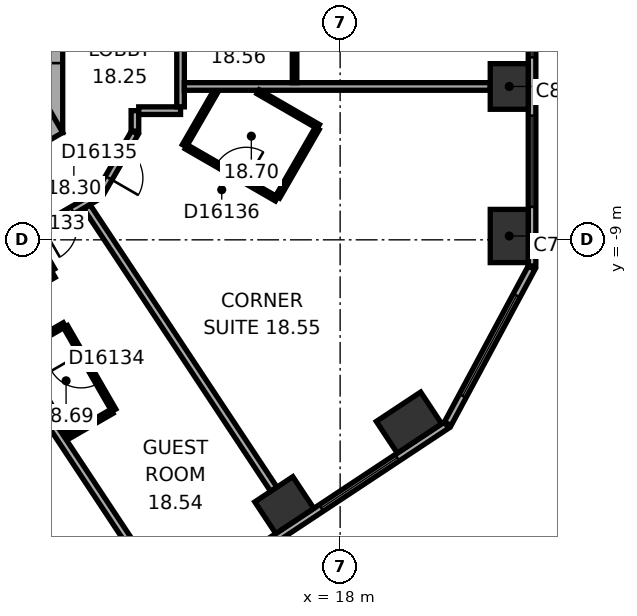
"""IFC4 building model, lengths in metres.
Left out: names, types, materials, properties, quantities, classifications, styles, units other than length and angle.
Written with IfcOpenShell. Run it as: python <this file> out.ifc"""

import sys

from ifc_helpers import new_model, si_unit, direction, frame, frame_2d, origin, origin_2d, place, context, subcontext, project, spatial, rectangle, extrude, element, fill, save


model = new_model("IFC4")
c1 = context("Model", 3, precision=1e-05, world=origin(), true_north=direction((0.0, 1.0)))
c2 = subcontext(c1, "Body", "Model", "MODEL_VIEW")
j1 = project(units=[si_unit("LENGTHUNIT", "METRE"), si_unit("PLANEANGLEUNIT", "RADIAN")], contexts=[c1])
p1 = place(None, origin())
s1 = spatial("IfcSite", under=j1, at=p1, CompositionType="ELEMENT")
p2 = place(p1, origin())
s2 = spatial("IfcBuilding", under=s1, at=p2, CompositionType="ELEMENT")
p3 = place(p2, frame((0.0, 0.0, 83.6)))
s3 = spatial("IfcBuildingStorey", under=s2, at=p3, CompositionType="ELEMENT", Elevation=83.6)
p4 = place(p3, frame((22.45, -8.899, 0.0), z_axis=(0.0, 0.0, 1.0), x_axis=(0.0, 1.0, 0.0)))
e1 = element("IfcColumn", 1, at=p4, inside=s3, PredefinedType="COLUMN", context=c2, shape_type="SweptSolid", body=[
    extrude(rectangle(XDim=1.4, YDim=1.0, at=origin_2d()), origin(), (0.0, 0.0, 1.0), 3.3),
])
for number, where, z_axis, x_axis in (
    (2, (22.45, -4.965, 0.0), (0.0, 0.0, 1.0), (0.0, 1.0, 0.0)),
    (3, (16.531, -15.981, 0.0), (0.0, 0.0, 1.0), (0.834, 0.552, 0.0)),
):
    element("IfcColumn", number, at=place(p3, frame(where, z_axis=z_axis, x_axis=x_axis)), inside=s3, PredefinedType="COLUMN", context=c2, shape_type="SweptSolid", body=[
        extrude(rectangle(XDim=1.2, YDim=1.0, at=origin_2d()), origin(), (0.0, 0.0, 1.0), 3.3),
    ])
p5 = place(p3, frame((19.812, -13.809, 0.0), z_axis=(0.0, 0.0, 1.0), x_axis=(0.833885822067, 0.551936985312, 0.0)))
e4 = element("IfcColumn", 4, at=p5, inside=s3, PredefinedType="COLUMN", context=c2, shape_type="SweptSolid", body=[
    extrude(rectangle(XDim=1.4, YDim=1.0, at=origin_2d()), origin(), (0.0, 0.0, 1.0), 3.3),
])
p6 = place(p3, frame((10.1, -6.177, 0.0), z_axis=(0.0, 0.0, 1.0), x_axis=(0.0, 1.0, 0.0)))
e5 = element("IfcWall", 5, at=p6, inside=s3, PredefinedType="SHEAR", context=c2, shape_type="SweptSolid", body=[
    extrude(rectangle(XDim=12.355, YDim=1.2, at=frame_2d((6.177, 0.0))), origin(), (0.0, 0.0, 1.0), 3.3),
])
p7 = place(p6, frame((6.378, 0.0, 0.0)))
e6 = element("IfcOpeningElement", 6, at=p7, cuts=e5, PredefinedType="OPENING", context=c2, shape_type="SweptSolid", body=[
    extrude(rectangle(XDim=1.5, YDim=2.1, at=frame_2d((0.75, 1.05))), frame((0.0, 0.61, 0.0), z_axis=(0.0, -1.0, 0.0), x_axis=(1.0, 0.0, 0.0)), (0.0, 0.0, 1.0), 1.22),
])
p8 = place(p6, frame((1.828, 0.0, 0.0)))
e7 = element("IfcOpeningElement", 7, at=p8, cuts=e5, PredefinedType="OPENING", context=c2, shape_type="SweptSolid", body=[
    extrude(rectangle(XDim=1.1, YDim=2.1, at=frame_2d((0.55, 1.05))), frame((0.0, 0.61, 0.0), z_axis=(0.0, -1.0, 0.0), x_axis=(1.0, 0.0, 0.0)), (0.0, 0.0, 1.0), 1.22),
])
p9 = place(p6, frame((4.427, 0.0, 0.0)))
e8 = element("IfcOpeningElement", 8, at=p9, cuts=e5, PredefinedType="OPENING", context=c2, shape_type="SweptSolid", body=[
    extrude(rectangle(XDim=1.1, YDim=2.1, at=frame_2d((0.55, 1.05))), frame((0.0, 0.61, 0.0), z_axis=(0.0, -1.0, 0.0), x_axis=(1.0, 0.0, 0.0)), (0.0, 0.0, 1.0), 1.22),
])
p10 = place(p3, frame((-0.3, -11.836, 0.0), z_axis=(0.0, 0.0, 1.0), x_axis=(0.866021384402, 0.500006961711, 0.0)))
e9 = element("IfcWall", 9, at=p10, inside=s3, PredefinedType="SHEAR", context=c2, shape_type="SweptSolid", body=[
    extrude(rectangle(XDim=12.355, YDim=1.2, at=frame_2d((6.178, 0.0))), origin(), (0.0, 0.0, 1.0), 3.3),
])
p11 = place(p10, frame((4.128, 0.0, 0.0)))
e10 = element("IfcOpeningElement", 10, at=p11, cuts=e9, PredefinedType="OPENING", context=c2, shape_type="SweptSolid", body=[
    extrude(rectangle(XDim=0.9, YDim=2.1, at=frame_2d((0.45, 1.05))), frame((0.0, 0.61, 0.0), z_axis=(0.0, -1.0, 0.0), x_axis=(1.0, 0.0, 0.0)), (0.0, 0.0, 1.0), 1.22),
])
p12 = place(p10, frame((7.928, 0.0, 0.0)))
e11 = element("IfcOpeningElement", 11, at=p12, cuts=e9, PredefinedType="OPENING", context=c2, shape_type="SweptSolid", body=[
    extrude(rectangle(XDim=1.1, YDim=2.1, at=frame_2d((0.55, 1.05))), frame((0.0, 0.61, 0.0), z_axis=(0.0, -1.0, 0.0), x_axis=(1.0, 0.0, 0.0)), (0.0, 0.0, 1.0), 1.22),
])
p13 = place(p3, frame((23.05, -9.687, 0.0), z_axis=(0.0, 0.0, 1.0), x_axis=(0.0, 1.0, 0.0)))
e12 = element("IfcWall", 12, at=p13, inside=s3, PredefinedType="STANDARD", context=c2, shape_type="SweptSolid", body=[
    extrude(rectangle(XDim=21.246, YDim=0.2, at=frame_2d((10.623, 0.0))), origin(), (0.0, 0.0, 1.0), 3.3),
])
p14 = place(p13, frame((1.555, 0.0, 0.8)))
e13 = element("IfcOpeningElement", 13, at=p14, cuts=e12, PredefinedType="OPENING", context=c2, shape_type="SweptSolid", body=[
    extrude(rectangle(XDim=2.4, YDim=1.7, at=frame_2d((1.2, 0.85))), frame((0.0, 0.11, 0.0), z_axis=(0.0, -1.0, 0.0), x_axis=(1.0, 0.0, 0.0)), (0.0, 0.0, 1.0), 0.22),
])
p15 = place(p13, frame((5.489, 0.0, 0.8)))
e14 = element("IfcOpeningElement", 14, at=p15, cuts=e12, PredefinedType="OPENING", context=c2, shape_type="SweptSolid", body=[
    extrude(rectangle(XDim=2.4, YDim=1.7, at=frame_2d((1.2, 0.85))), frame((0.0, 0.11, 0.0), z_axis=(0.0, -1.0, 0.0), x_axis=(1.0, 0.0, 0.0)), (0.0, 0.0, 1.0), 0.22),
])
p16 = place(p13, frame((9.424, 0.0, 0.8)))
e15 = element("IfcOpeningElement", 15, at=p16, cuts=e12, PredefinedType="OPENING", context=c2, shape_type="SweptSolid", body=[
    extrude(rectangle(XDim=2.4, YDim=1.7, at=frame_2d((1.2, 0.85))), frame((0.0, 0.11, 0.0), z_axis=(0.0, -1.0, 0.0), x_axis=(1.0, 0.0, 0.0)), (0.0, 0.0, 1.0), 0.22),
])
p17 = place(p13, frame((13.358, 0.0, 0.8)))
e16 = element("IfcOpeningElement", 16, at=p17, cuts=e12, PredefinedType="OPENING", context=c2, shape_type="SweptSolid", body=[
    extrude(rectangle(XDim=2.4, YDim=1.7, at=frame_2d((1.2, 0.85))), frame((0.0, 0.11, 0.0), z_axis=(0.0, -1.0, 0.0), x_axis=(1.0, 0.0, 0.0)), (0.0, 0.0, 1.0), 0.22),
])
p18 = place(p13, frame((17.293, 0.0, 0.8)))
e17 = element("IfcOpeningElement", 17, at=p18, cuts=e12, PredefinedType="OPENING", context=c2, shape_type="SweptSolid", body=[
    extrude(rectangle(XDim=2.4, YDim=1.7, at=frame_2d((1.2, 0.85))), frame((0.0, 0.11, 0.0), z_axis=(0.0, -1.0, 0.0), x_axis=(1.0, 0.0, 0.0)), (0.0, 0.0, 1.0), 0.22),
])
p19 = place(p3, frame((3.083, -25.601, 0.0), z_axis=(0.0, 0.0, 1.0), x_axis=(0.833884295743, 0.551939291329, 0.0)))
e18 = element("IfcWall", 18, at=p19, inside=s3, PredefinedType="STANDARD", context=c2, shape_type="SweptSolid", body=[
    extrude(rectangle(XDim=21.246, YDim=0.2, at=frame_2d((10.623, 0.0))), origin(), (0.0, 0.0, 1.0), 3.3),
])
p20 = place(p19, frame((1.553, 0.0, 0.8)))
e19 = element("IfcOpeningElement", 19, at=p20, cuts=e18, PredefinedType="OPENING", context=c2, shape_type="SweptSolid", body=[
    extrude(rectangle(XDim=2.4, YDim=1.7, at=frame_2d((1.2, 0.85))), frame((0.0, 0.11, 0.0), z_axis=(0.0, -1.0, 0.0), x_axis=(1.0, 0.0, 0.0)), (0.0, 0.0, 1.0), 0.22),
])
p21 = place(p19, frame((5.488, 0.0, 0.8)))
e20 = element("IfcOpeningElement", 20, at=p21, cuts=e18, PredefinedType="OPENING", context=c2, shape_type="SweptSolid", body=[
    extrude(rectangle(XDim=2.4, YDim=1.7, at=frame_2d((1.2, 0.85))), frame((0.0, 0.11, 0.0), z_axis=(0.0, -1.0, 0.0), x_axis=(1.0, 0.0, 0.0)), (0.0, 0.0, 1.0), 0.22),
])
p22 = place(p19, frame((9.422, 0.0, 0.8)))
e21 = element("IfcOpeningElement", 21, at=p22, cuts=e18, PredefinedType="OPENING", context=c2, shape_type="SweptSolid", body=[
    extrude(rectangle(XDim=2.4, YDim=1.7, at=frame_2d((1.2, 0.85))), frame((0.0, 0.11, 0.0), z_axis=(0.0, -1.0, 0.0), x_axis=(1.0, 0.0, 0.0)), (0.0, 0.0, 1.0), 0.22),
])
p23 = place(p19, frame((13.357, 0.0, 0.8)))
e22 = element("IfcOpeningElement", 22, at=p23, cuts=e18, PredefinedType="OPENING", context=c2, shape_type="SweptSolid", body=[
    extrude(rectangle(XDim=2.4, YDim=1.7, at=frame_2d((1.2, 0.85))), frame((0.0, 0.11, 0.0), z_axis=(0.0, -1.0, 0.0), x_axis=(1.0, 0.0, 0.0)), (0.0, 0.0, 1.0), 0.22),
])
p24 = place(p19, frame((17.291, 0.0, 0.8)))
e23 = element("IfcOpeningElement", 23, at=p24, cuts=e18, PredefinedType="OPENING", context=c2, shape_type="SweptSolid", body=[
    extrude(rectangle(XDim=2.4, YDim=1.7, at=frame_2d((1.2, 0.85))), frame((0.0, 0.11, 0.0), z_axis=(0.0, -1.0, 0.0), x_axis=(1.0, 0.0, 0.0)), (0.0, 0.0, 1.0), 0.22),
])
p25 = place(p3, frame((20.833, -13.839, 0.0), z_axis=(0.0, 0.0, 1.0), x_axis=(0.473321668581, 0.880889662813, 0.0)))
e24 = element("IfcWall", 24, at=p25, inside=s3, PredefinedType="STANDARD", context=c2, shape_type="SweptSolid", body=[
    extrude(rectangle(XDim=4.66, YDim=0.2, at=frame_2d((2.33, 0.0))), origin(), (0.0, 0.0, 1.0), 3.3),
])
p26 = place(p25, frame((0.83, 0.0, 0.8)))
e25 = element("IfcOpeningElement", 25, at=p26, cuts=e24, PredefinedType="OPENING", context=c2, shape_type="SweptSolid", body=[
    extrude(rectangle(XDim=3.0, YDim=1.7, at=frame_2d((1.5, 0.85))), frame((0.0, 0.11, 0.0), z_axis=(0.0, -1.0, 0.0), x_axis=(1.0, 0.0, 0.0)), (0.0, 0.0, 1.0), 0.22),
])
p27 = place(p3, frame((7.419, -11.653, 0.0), z_axis=(0.0, 0.0, 1.0), x_axis=(0.866038154057, 0.49997791523, 0.0)))
e26 = element("IfcWall", 26, at=p27, inside=s3, PredefinedType="PARTITIONING", context=c2, shape_type="SweptSolid", body=[
    extrude(rectangle(XDim=3.502, YDim=0.2, at=frame_2d((1.751, 0.0))), origin(), (0.0, 0.0, 1.0), 3.05),
])
p28 = place(p3, frame((9.532, -11.934, 0.0), z_axis=(0.0, 0.0, 1.0), x_axis=(0.866034573852, 0.49998411664, 0.0)))
e27 = element("IfcWall", 27, at=p28, inside=s3, PredefinedType="PARTITIONING", context=c2, shape_type="SweptSolid", body=[
    extrude(rectangle(XDim=1.4, YDim=0.12, at=frame_2d((0.7, 0.0))), origin(), (0.0, 0.0, 1.0), 3.05),
])
p29 = place(p3, frame((9.852, -8.861, 0.0), z_axis=(0.0, 0.0, 1.0), x_axis=(0.866013291437, 0.500020978615, 0.0)))
e28 = element("IfcWall", 28, at=p29, inside=s3, PredefinedType="PARTITIONING", context=c2, shape_type="SweptSolid", body=[
    extrude(rectangle(XDim=2.077, YDim=0.2, at=frame_2d((1.038, 0.0))), origin(), (0.0, 0.0, 1.0), 3.05),
])
p30 = place(p29, frame((0.372, 0.0, 0.0)))
e29 = element("IfcOpeningElement", 29, at=p30, cuts=e28, PredefinedType="OPENING", context=c2, shape_type="SweptSolid", body=[
    extrude(rectangle(XDim=0.9, YDim=2.1, at=frame_2d((0.45, 1.05))), frame((0.0, 0.11, 0.0), z_axis=(0.0, -1.0, 0.0), x_axis=(1.0, 0.0, 0.0)), (0.0, 0.0, 1.0), 0.22),
])
p31 = place(p3, frame((10.402, -9.815, 0.0), z_axis=(0.0, 0.0, 1.0), x_axis=(-0.499968756647, 0.866043441391, 0.0)))
e30 = element("IfcWall", 30, at=p31, inside=s3, PredefinedType="PARTITIONING", context=c2, shape_type="SweptSolid", body=[
    extrude(rectangle(XDim=1.001, YDim=0.2, at=frame_2d((0.5, 0.0))), origin(), (0.0, 0.0, 1.0), 3.05),
])
p32 = place(p3, frame((10.775, -11.286, 0.0), z_axis=(0.0, 0.0, 1.0), x_axis=(0.500046963369, -0.865998287773, 0.0)))
e31 = element("IfcWall", 31, at=p32, inside=s3, PredefinedType="PARTITIONING", context=c2, shape_type="SweptSolid", body=[
    extrude(rectangle(XDim=2.54, YDim=0.12, at=frame_2d((1.27, 0.0))), origin(), (0.0, 0.0, 1.0), 3.05),
])
p33 = place(p32, frame((0.82, 0.0, 0.0)))
e32 = element("IfcOpeningElement", 32, at=p33, cuts=e31, PredefinedType="OPENING", context=c2, shape_type="SweptSolid", body=[
    extrude(rectangle(XDim=0.9, YDim=2.1, at=frame_2d((0.45, 1.05))), frame((0.0, 0.07, 0.0), z_axis=(0.0, -1.0, 0.0), x_axis=(1.0, 0.0, 0.0)), (0.0, 0.0, 1.0), 0.14),
])
p34 = place(p3, frame((10.833, -14.185, 0.0), z_axis=(0.0, 0.0, 1.0), x_axis=(-0.500005339912, 0.866022320763, 0.0)))
e33 = element("IfcWall", 33, at=p34, inside=s3, PredefinedType="PARTITIONING", context=c2, shape_type="SweptSolid", body=[
    extrude(rectangle(XDim=2.54, YDim=0.12, at=frame_2d((1.27, 0.0))), origin(), (0.0, 0.0, 1.0), 3.05),
])
p35 = place(p3, frame((11.67, -7.788, 0.0), z_axis=(0.0, 0.0, 1.0), x_axis=(0.500063286585, 0.865988862174, 0.0)))
e34 = element("IfcWall", 34, at=p35, inside=s3, PredefinedType="PARTITIONING", context=c2, shape_type="SweptSolid", body=[
    extrude(rectangle(XDim=1.86, YDim=0.2, at=frame_2d((0.93, 0.0))), origin(), (0.0, 0.0, 1.0), 3.05),
])
p36 = place(p35, frame((0.48, 0.0, 0.0)))
e35 = element("IfcOpeningElement", 35, at=p36, cuts=e34, PredefinedType="OPENING", context=c2, shape_type="SweptSolid", body=[
    extrude(rectangle(XDim=0.9, YDim=2.1, at=frame_2d((0.45, 1.05))), frame((0.0, 0.11, 0.0), z_axis=(0.0, -1.0, 0.0), x_axis=(1.0, 0.0, 0.0)), (0.0, 0.0, 1.0), 0.22),
])
p37 = place(p3, frame((11.993, -13.515, 0.0), z_axis=(0.0, 0.0, 1.0), x_axis=(-0.865956862152, -0.500118698802, 0.0)))
e36 = element("IfcWall", 36, at=p37, inside=s3, PredefinedType="PARTITIONING", context=c2, shape_type="SweptSolid", body=[
    extrude(rectangle(XDim=1.28, YDim=0.12, at=frame_2d((0.64, 0.0))), origin(), (0.0, 0.0, 1.0), 3.05),
])
p38 = place(p3, frame((12.6, -6.138, 0.0), z_axis=(0.0, 0.0, 1.0), x_axis=(0.0, 1.0, 0.0)))
e37 = element("IfcWall", 37, at=p38, inside=s3, PredefinedType="PARTITIONING", context=c2, shape_type="SweptSolid", body=[
    extrude(rectangle(XDim=0.537, YDim=0.2, at=frame_2d((0.268, 0.0))), origin(), (0.0, 0.0, 1.0), 3.05),
])
p39 = place(p3, frame((12.7, -5.601, 0.0), z_axis=(0.0, 0.0, 1.0), x_axis=(1.0, 0.0, 0.0)))
e38 = element("IfcWall", 38, at=p39, inside=s3, PredefinedType="PARTITIONING", context=c2, shape_type="SweptSolid", body=[
    extrude(rectangle(XDim=1.101, YDim=0.2, at=frame_2d((0.551, 0.0))), origin(), (0.0, 0.0, 1.0), 3.05),
])
p40 = place(p3, frame((12.974, -17.735, 0.0), z_axis=(0.0, 0.0, 1.0), x_axis=(-0.55192625685, 0.833892922982, 0.0)))
e39 = element("IfcWall", 39, at=p40, inside=s3, PredefinedType="PARTITIONING", context=c2, shape_type="SweptSolid", body=[
    extrude(rectangle(XDim=7.95, YDim=0.2, at=frame_2d((3.975, 0.0))), origin(), (0.0, 0.0, 1.0), 3.05),
])
p41 = place(p3, frame((13.801, -5.501, 0.0), z_axis=(0.0, 0.0, 1.0), x_axis=(0.0, 1.0, 0.0)))
e40 = element("IfcWall", 40, at=p41, inside=s3, PredefinedType="PARTITIONING", context=c2, shape_type="SweptSolid", body=[
    extrude(rectangle(XDim=5.702, YDim=0.2, at=frame_2d((2.851, 0.0))), origin(), (0.0, 0.0, 1.0), 3.05),
])
p42 = place(p41, frame((3.296, 0.0, 0.0)))
e41 = element("IfcOpeningElement", 41, at=p42, cuts=e40, PredefinedType="OPENING", context=c2, shape_type="SweptSolid", body=[
    extrude(rectangle(XDim=0.9, YDim=2.1, at=frame_2d((0.45, 1.05))), frame((0.0, 0.11, 0.0), z_axis=(0.0, -1.0, 0.0), x_axis=(1.0, 0.0, 0.0)), (0.0, 0.0, 1.0), 0.22),
])
p43 = place(p3, frame((13.901, -6.524, 0.0), z_axis=(0.0, 0.0, 1.0), x_axis=(0.499964162598, 0.86604609353, 0.0)))
e42 = element("IfcWall", 42, at=p43, inside=s3, PredefinedType="PARTITIONING", context=c2, shape_type="SweptSolid", body=[
    extrude(rectangle(XDim=1.661, YDim=0.12, at=frame_2d((0.831, 0.0))), origin(), (0.0, 0.0, 1.0), 3.05),
])
p44 = place(p3, frame((13.901, -4.965, 0.0), z_axis=(0.0, 0.0, 1.0), x_axis=(1.0, 0.0, 0.0)))
e43 = element("IfcWall", 43, at=p44, inside=s3, PredefinedType="PARTITIONING", context=c2, shape_type="SweptSolid", body=[
    extrude(rectangle(XDim=8.049, YDim=0.2, at=frame_2d((4.024, 0.0))), origin(), (0.0, 0.0, 1.0), 3.05),
])
p45 = place(p3, frame((15.841, -5.104, 0.0), z_axis=(0.0, 0.0, 1.0), x_axis=(0.866025591402, -0.499999675036, 0.0)))
e44 = element("IfcWall", 44, at=p45, inside=s3, PredefinedType="PARTITIONING", context=c2, shape_type="SweptSolid", body=[
    extrude(rectangle(XDim=1.83, YDim=0.12, at=frame_2d((0.915, 0.0))), origin(), (0.0, 0.0, 1.0), 3.05),
])
p46 = place(p3, frame((16.255, -15.564, 0.0), z_axis=(0.0, 0.0, 1.0), x_axis=(-0.55192208744, 0.833895682562, 0.0)))
e45 = element("IfcWall", 45, at=p46, inside=s3, PredefinedType="PARTITIONING", context=c2, shape_type="SweptSolid", body=[
    extrude(rectangle(XDim=8.913, YDim=0.2, at=frame_2d((4.457, 0.0))), origin(), (0.0, 0.0, 1.0), 2.6),
])
p47 = place(p3, frame((16.326, -7.925, 0.0), z_axis=(0.0, 0.0, 1.0), x_axis=(-0.865997131366, 0.500048966069, 0.0)))
e46 = element("IfcWall", 46, at=p47, inside=s3, PredefinedType="PARTITIONING", context=c2, shape_type="SweptSolid", body=[
    extrude(rectangle(XDim=2.74, YDim=0.12, at=frame_2d((1.37, 0.0))), origin(), (0.0, 0.0, 1.0), 3.05),
])
p48 = place(p47, frame((0.92, 0.0, 0.0)))
e47 = element("IfcOpeningElement", 47, at=p48, cuts=e46, PredefinedType="OPENING", context=c2, shape_type="SweptSolid", body=[
    extrude(rectangle(XDim=0.9, YDim=2.1, at=frame_2d((0.45, 1.05))), frame((0.0, 0.07, 0.0), z_axis=(0.0, -1.0, 0.0), x_axis=(1.0, 0.0, 0.0)), (0.0, 0.0, 1.0), 0.14),
])
p49 = place(p3, frame((16.801, -2.59, 0.0), z_axis=(0.0, 0.0, 1.0), x_axis=(0.0, -1.0, 0.0)))
e48 = element("IfcWall", 48, at=p49, inside=s3, PredefinedType="PARTITIONING", context=c2, shape_type="SweptSolid", body=[
    extrude(rectangle(XDim=2.274, YDim=0.12, at=frame_2d((1.137, 0.0))), origin(), (0.0, 0.0, 1.0), 3.05),
])
p50 = place(p3, frame((17.396, -6.071, 0.0), z_axis=(0.0, 0.0, 1.0), x_axis=(-0.500027264788, -0.866009661879, 0.0)))
e49 = element("IfcWall", 49, at=p50, inside=s3, PredefinedType="PARTITIONING", context=c2, shape_type="SweptSolid", body=[
    extrude(rectangle(XDim=2.08, YDim=0.12, at=frame_2d((1.04, 0.0))), origin(), (0.0, 0.0, 1.0), 3.05),
])
p51 = place(p14, origin())
e50 = element("IfcWindow", 50, at=p51, inside=s3, PartitioningType="SINGLE_PANEL", PredefinedType="WINDOW", context=c2, shape_type="SweptSolid", body=[
    extrude(rectangle(XDim=2.4, YDim=1.7, at=frame_2d((1.2, 0.85))), frame((0.0, 0.03, 0.0), z_axis=(0.0, -1.0, 0.0), x_axis=(1.0, 0.0, 0.0)), (0.0, 0.0, 1.0), 0.06),
])
fill(e13, e50)
p52 = place(p15, origin())
e51 = element("IfcWindow", 51, at=p52, inside=s3, PartitioningType="SINGLE_PANEL", PredefinedType="WINDOW", context=c2, shape_type="SweptSolid", body=[
    extrude(rectangle(XDim=2.4, YDim=1.7, at=frame_2d((1.2, 0.85))), frame((0.0, 0.03, 0.0), z_axis=(0.0, -1.0, 0.0), x_axis=(1.0, 0.0, 0.0)), (0.0, 0.0, 1.0), 0.06),
])
fill(e14, e51)
p53 = place(p24, origin())
e52 = element("IfcWindow", 52, at=p53, inside=s3, PartitioningType="SINGLE_PANEL", PredefinedType="WINDOW", context=c2, shape_type="SweptSolid", body=[
    extrude(rectangle(XDim=2.4, YDim=1.7, at=frame_2d((1.2, 0.85))), frame((0.0, 0.03, 0.0), z_axis=(0.0, -1.0, 0.0), x_axis=(1.0, 0.0, 0.0)), (0.0, 0.0, 1.0), 0.06),
])
fill(e23, e52)
p54 = place(p26, origin())
e53 = element("IfcWindow", 53, at=p54, inside=s3, PartitioningType="SINGLE_PANEL", PredefinedType="WINDOW", context=c2, shape_type="SweptSolid", body=[
    extrude(rectangle(XDim=3.0, YDim=1.7, at=frame_2d((1.5, 0.85))), frame((0.0, 0.03, 0.0), z_axis=(0.0, -1.0, 0.0), x_axis=(1.0, 0.0, 0.0)), (0.0, 0.0, 1.0), 0.06),
])
fill(e25, e53)
p55 = place(p30, origin())
e54 = element("IfcDoor", 54, at=p55, inside=s3, OperationType="SINGLE_SWING_LEFT", PredefinedType="DOOR", context=c2, shape_type="SweptSolid", body=[
    extrude(rectangle(XDim=0.9, YDim=2.1, at=frame_2d((0.45, 1.05))), frame((0.0, 0.025, 0.0), z_axis=(0.0, -1.0, 0.0), x_axis=(1.0, 0.0, 0.0)), (0.0, 0.0, 1.0), 0.05),
])
fill(e29, e54)
p56 = place(p33, origin())
e55 = element("IfcDoor", 55, at=p56, inside=s3, OperationType="SINGLE_SWING_LEFT", PredefinedType="DOOR", context=c2, shape_type="SweptSolid", body=[
    extrude(rectangle(XDim=0.9, YDim=2.1, at=frame_2d((0.45, 1.05))), frame((0.0, 0.025, 0.0), z_axis=(0.0, -1.0, 0.0), x_axis=(1.0, 0.0, 0.0)), (0.0, 0.0, 1.0), 0.05),
])
fill(e32, e55)
p57 = place(p36, origin())
e56 = element("IfcDoor", 56, at=p57, inside=s3, OperationType="SINGLE_SWING_LEFT", PredefinedType="DOOR", context=c2, shape_type="SweptSolid", body=[
    extrude(rectangle(XDim=0.9, YDim=2.1, at=frame_2d((0.45, 1.05))), frame((0.0, 0.025, 0.0), z_axis=(0.0, -1.0, 0.0), x_axis=(1.0, 0.0, 0.0)), (0.0, 0.0, 1.0), 0.05),
])
fill(e35, e56)
p58 = place(p48, origin())
e57 = element("IfcDoor", 57, at=p58, inside=s3, OperationType="SINGLE_SWING_LEFT", PredefinedType="DOOR", context=c2, shape_type="SweptSolid", body=[
    extrude(rectangle(XDim=0.9, YDim=2.1, at=frame_2d((0.45, 1.05))), frame((0.0, 0.025, 0.0), z_axis=(0.0, -1.0, 0.0), x_axis=(1.0, 0.0, 0.0)), (0.0, 0.0, 1.0), 0.05),
])
fill(e47, e57)
save(model, sys.argv[1])
